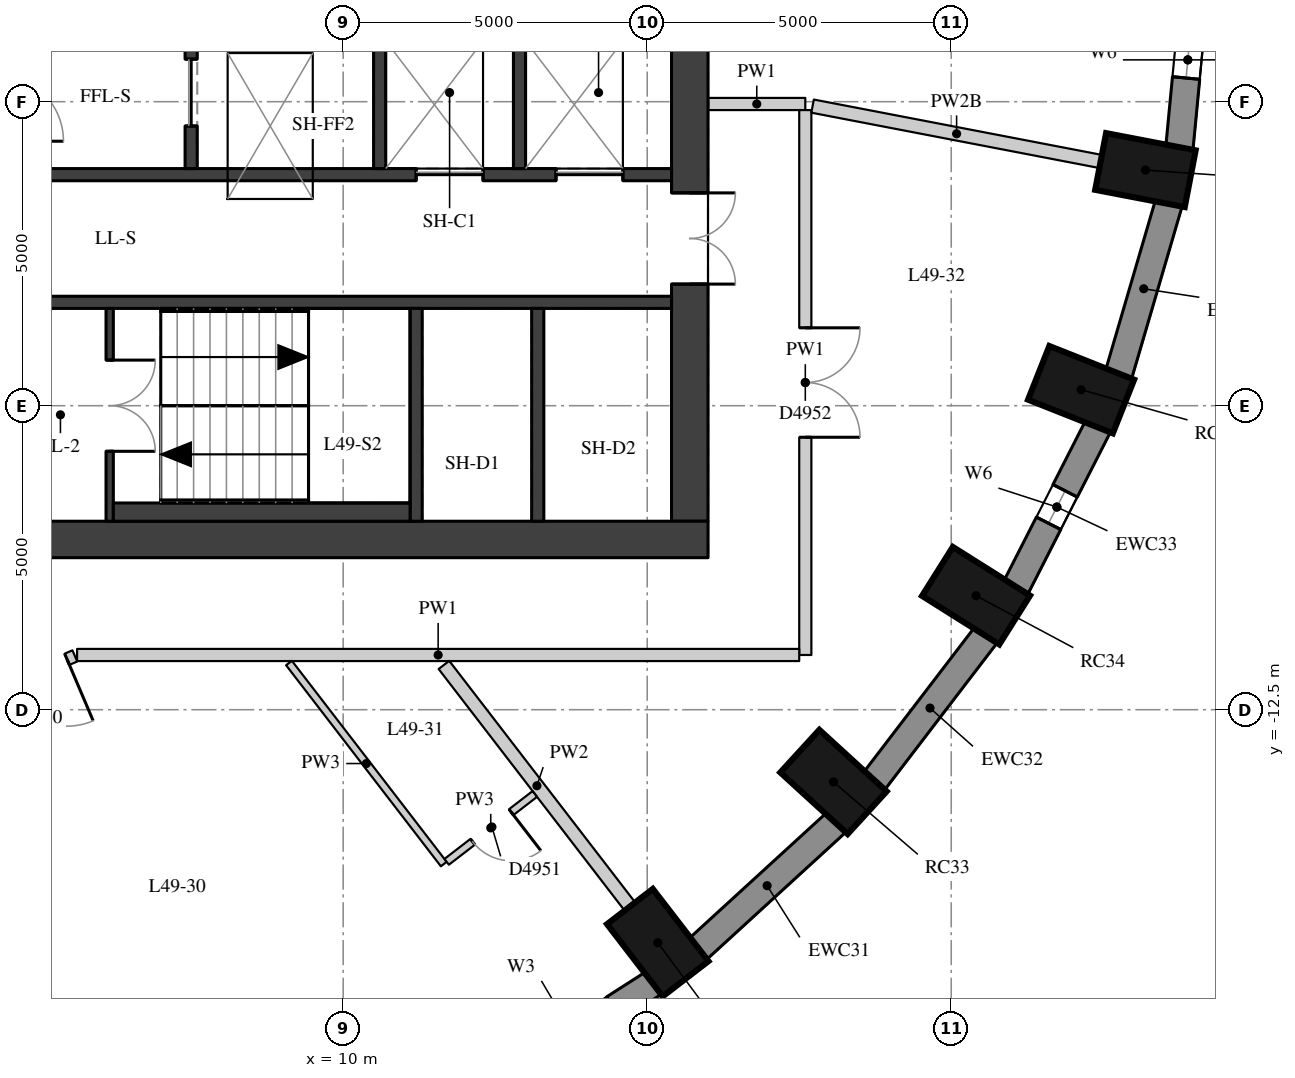
"""IFC4 building model, lengths in metres.
Left out: names, types, materials, properties, quantities, classifications, styles, units other than length and angle.
Written with IfcOpenShell. Run it as: python <this file> out.ifc"""

import sys

from ifc_helpers import new_model, si_unit, direction, frame, frame_2d, origin, origin_2d, place, context, subcontext, project, spatial, rectangle, extrude, element, fill, save


model = new_model("IFC4")
c1 = context("Model", 3, precision=1e-05, world=origin(), true_north=direction((0.0, 1.0)))
c2 = subcontext(c1, "Body", "Model", "MODEL_VIEW")
j1 = project(units=[si_unit("LENGTHUNIT", "METRE"), si_unit("PLANEANGLEUNIT", "RADIAN")], contexts=[c1])
p1 = place(None, origin())
s1 = spatial("IfcSite", under=j1, at=p1, CompositionType="ELEMENT")
p2 = place(p1, origin())
s2 = spatial("IfcBuilding", under=s1, at=p2, CompositionType="ELEMENT")
p3 = place(p2, frame((0.0, 0.0, 174.8)))
s3 = spatial("IfcBuildingStorey", under=s2, at=p3, CompositionType="ELEMENT", Elevation=174.8)
for number, where, z_axis, x_axis in (
    (1, (15.173, -16.332, 0.0), (0.0, 0.0, 1.0), (0.61, -0.792, 0.0)),
    (2, (18.064, -13.688, 0.0), (0.0, 0.0, 1.0), (0.738, -0.675, 0.0)),
    (3, (20.408, -10.625, 0.0), (0.0, 0.0, 1.0), (0.846, -0.533, 0.0)),
    (4, (22.136, -7.236, 0.0), (0.0, 0.0, 1.0), (0.93, -0.369, 0.0)),
    (5, (23.194, -3.625, 0.0), (0.0, 0.0, 1.0), (0.982, -0.189, 0.0)),
):
    element("IfcColumn", number, at=place(p3, frame(where, z_axis=z_axis, x_axis=x_axis)), inside=s3, PredefinedType="COLUMN", context=c2, shape_type="SweptSolid", body=[
        extrude(rectangle(XDim=1.5, YDim=0.95, at=origin_2d()), origin(), (0.0, 0.0, 1.0), 3.3),
    ])
p4 = place(p3, frame((12.455, -18.693, 0.0), z_axis=(0.0, 0.0, 1.0), x_axis=(0.842065914439, 0.539374633943, 0.0)))
e6 = element("IfcWall", 6, at=p4, inside=s3, PredefinedType="SOLIDWALL", context=c2, shape_type="SweptSolid", body=[
    extrude(rectangle(XDim=3.151, YDim=0.45, at=frame_2d((1.576, 0.0))), origin(), (0.0, 0.0, 1.0), 3.02),
])
p5 = place(p4, frame((0.776, 0.0, 0.4)))
e7 = element("IfcOpeningElement", 7, at=p5, cuts=e6, PredefinedType="OPENING", context=c2, shape_type="SweptSolid", body=[
    extrude(rectangle(XDim=1.6, YDim=1.75, at=frame_2d((0.8, 0.875))), frame((0.0, 0.235, 0.0), z_axis=(0.0, -1.0, 0.0), x_axis=(1.0, 0.0, 0.0)), (0.0, 0.0, 1.0), 0.47),
])
p6 = place(p3, frame((15.83, -16.439, 0.0), z_axis=(0.0, 0.0, 1.0), x_axis=(0.737808755941, 0.675009807082, 0.0)))
e8 = element("IfcWall", 8, at=p6, inside=s3, PredefinedType="SOLIDWALL", context=c2, shape_type="SweptSolid", body=[
    extrude(rectangle(XDim=3.094, YDim=0.45, at=frame_2d((1.547, 0.0))), origin(), (0.0, 0.0, 1.0), 3.02),
])
p7 = place(p3, frame((18.728, -13.679, 0.0), z_axis=(0.0, 0.0, 1.0), x_axis=(0.607817056371, 0.794077090706, 0.0)))
e9 = element("IfcWall", 9, at=p7, inside=s3, PredefinedType="SOLIDWALL", context=c2, shape_type="SweptSolid", body=[
    extrude(rectangle(XDim=3.037, YDim=0.45, at=frame_2d((1.519, 0.0))), origin(), (0.0, 0.0, 1.0), 3.02),
])
p8 = place(p3, frame((21.059, -10.497, 0.0), z_axis=(0.0, 0.0, 1.0), x_axis=(0.454133999889, 0.890933392653, 0.0)))
e10 = element("IfcWall", 10, at=p8, inside=s3, PredefinedType="SOLIDWALL", context=c2, shape_type="SweptSolid", body=[
    extrude(rectangle(XDim=2.986, YDim=0.45, at=frame_2d((1.493, 0.0))), origin(), (0.0, 0.0, 1.0), 3.02),
])
p9 = place(p8, frame((1.193, 0.0, 0.4)))
e11 = element("IfcOpeningElement", 11, at=p9, cuts=e10, PredefinedType="OPENING", context=c2, shape_type="SweptSolid", body=[
    extrude(rectangle(XDim=0.6, YDim=1.75, at=frame_2d((0.3, 0.875))), frame((0.0, 0.235, 0.0), z_axis=(0.0, -1.0, 0.0), x_axis=(1.0, 0.0, 0.0)), (0.0, 0.0, 1.0), 0.47),
])
p10 = place(p3, frame((22.751, -6.991, 0.0), z_axis=(0.0, 0.0, 1.0), x_axis=(0.281049481624, 0.959693278542, 0.0)))
e12 = element("IfcWall", 12, at=p10, inside=s3, PredefinedType="SOLIDWALL", context=c2, shape_type="SweptSolid", body=[
    extrude(rectangle(XDim=2.948, YDim=0.45, at=frame_2d((1.474, 0.0))), origin(), (0.0, 0.0, 1.0), 3.02),
])
p11 = place(p3, frame((23.752, -3.269, 0.0), z_axis=(0.0, 0.0, 1.0), x_axis=(0.095257827044, 0.995452633924, 0.0)))
e13 = element("IfcWall", 13, at=p11, inside=s3, PredefinedType="SOLIDWALL", context=c2, shape_type="SweptSolid", body=[
    extrude(rectangle(XDim=2.927, YDim=0.45, at=frame_2d((1.463, 0.0))), origin(), (0.0, 0.0, 1.0), 3.02),
])
p12 = place(p11, frame((1.163, 0.0, 0.4)))
e14 = element("IfcOpeningElement", 14, at=p12, cuts=e13, PredefinedType="OPENING", context=c2, shape_type="SweptSolid", body=[
    extrude(rectangle(XDim=0.6, YDim=1.75, at=frame_2d((0.3, 0.875))), frame((0.0, 0.235, 0.0), z_axis=(0.0, -1.0, 0.0), x_axis=(1.0, 0.0, 0.0)), (0.0, 0.0, 1.0), 0.47),
])
p13 = place(p3, frame((15.7, -9.4, 0.0), z_axis=(0.0, 0.0, 1.0), x_axis=(0.0, 1.0, 0.0)))
e15 = element("IfcWall", 15, at=p13, inside=s3, PredefinedType="SHEAR", context=c2, shape_type="SweptSolid", body=[
    extrude(rectangle(XDim=18.8, YDim=0.6, at=frame_2d((9.4, 0.0))), origin(), (0.0, 0.0, 1.0), 3.02),
])
p14 = place(p13, frame((13.4, 0.0, 0.0)))
e16 = element("IfcOpeningElement", 16, at=p14, cuts=e15, PredefinedType="OPENING", context=c2, shape_type="SweptSolid", body=[
    extrude(rectangle(XDim=1.5, YDim=2.1, at=frame_2d((0.75, 1.05))), frame((0.0, 0.31, 0.0), z_axis=(0.0, -1.0, 0.0), x_axis=(1.0, 0.0, 0.0)), (0.0, 0.0, 1.0), 0.62),
])
p15 = place(p13, frame((3.9, 0.0, 0.0)))
e17 = element("IfcOpeningElement", 17, at=p15, cuts=e15, PredefinedType="OPENING", context=c2, shape_type="SweptSolid", body=[
    extrude(rectangle(XDim=1.5, YDim=2.1, at=frame_2d((0.75, 1.05))), frame((0.0, 0.31, 0.0), z_axis=(0.0, -1.0, 0.0), x_axis=(1.0, 0.0, 0.0)), (0.0, 0.0, 1.0), 0.62),
])
p16 = place(p3, frame((4.0, -9.7, 0.0), z_axis=(0.0, 0.0, 1.0), x_axis=(1.0, 0.0, 0.0)))
e18 = element("IfcWall", 18, at=p16, inside=s3, PredefinedType="SHEAR", context=c2, shape_type="SweptSolid", body=[
    extrude(rectangle(XDim=12.0, YDim=0.6, at=frame_2d((6.0, 0.0))), origin(), (0.0, 0.0, 1.0), 3.02),
])
p17 = place(p3, frame((4.6, -3.7, 0.0), z_axis=(0.0, 0.0, 1.0), x_axis=(1.0, 0.0, 0.0)))
e19 = element("IfcWall", 19, at=p17, inside=s3, PredefinedType="SHEAR", context=c2, shape_type="SweptSolid", body=[
    extrude(rectangle(XDim=10.8, YDim=0.2, at=frame_2d((5.4, 0.0))), origin(), (0.0, 0.0, 1.0), 3.02),
])
p18 = place(p17, frame((6.6, 0.0, 0.0)))
e20 = element("IfcOpeningElement", 20, at=p18, cuts=e19, PredefinedType="OPENING", context=c2, shape_type="SweptSolid", body=[
    extrude(rectangle(XDim=1.1, YDim=2.1, at=frame_2d((0.55, 1.05))), frame((0.0, 0.11, 0.0), z_axis=(0.0, -1.0, 0.0), x_axis=(1.0, 0.0, 0.0)), (0.0, 0.0, 1.0), 0.22),
])
p19 = place(p17, frame((8.9, 0.0, 0.0)))
e21 = element("IfcOpeningElement", 21, at=p19, cuts=e19, PredefinedType="OPENING", context=c2, shape_type="SweptSolid", body=[
    extrude(rectangle(XDim=1.1, YDim=2.1, at=frame_2d((0.55, 1.05))), frame((0.0, 0.11, 0.0), z_axis=(0.0, -1.0, 0.0), x_axis=(1.0, 0.0, 0.0)), (0.0, 0.0, 1.0), 0.22),
])
p20 = place(p3, frame((4.6, -5.8, 0.0), z_axis=(0.0, 0.0, 1.0), x_axis=(1.0, 0.0, 0.0)))
e22 = element("IfcWall", 22, at=p20, inside=s3, PredefinedType="SHEAR", context=c2, shape_type="SweptSolid", body=[
    extrude(rectangle(XDim=10.8, YDim=0.2, at=frame_2d((5.4, 0.0))), origin(), (0.0, 0.0, 1.0), 3.02),
])
for number, where, z_axis, x_axis in (
    (23, (11.2, -9.4, 0.0), (0.0, 0.0, 1.0), (0.0, 1.0, 0.0)),
    (24, (13.2, -9.4, 0.0), (0.0, 0.0, 1.0), (0.0, 1.0, 0.0)),
):
    element("IfcWall", number, at=place(p3, frame(where, z_axis=z_axis, x_axis=x_axis)), inside=s3, PredefinedType="SHEAR", context=c2, shape_type="SweptSolid", body=[
        extrude(rectangle(XDim=3.5, YDim=0.2, at=frame_2d((1.75, 0.0))), origin(), (0.0, 0.0, 1.0), 3.02),
    ])
p21 = place(p3, frame((7.5, -3.6, 0.0), z_axis=(0.0, 0.0, 1.0), x_axis=(0.0, 1.0, 0.0)))
e25 = element("IfcWall", 25, at=p21, inside=s3, PredefinedType="SHEAR", context=c2, shape_type="SweptSolid", body=[
    extrude(rectangle(XDim=2.5, YDim=0.2, at=frame_2d((1.25, 0.0))), origin(), (0.0, 0.0, 1.0), 3.02),
])
p22 = place(p21, frame((0.7, 0.0, 0.0)))
e26 = element("IfcOpeningElement", 26, at=p22, cuts=e25, PredefinedType="OPENING", context=c2, shape_type="SweptSolid", body=[
    extrude(rectangle(XDim=1.1, YDim=2.1, at=frame_2d((0.55, 1.05))), frame((0.0, 0.11, 0.0), z_axis=(0.0, -1.0, 0.0), x_axis=(1.0, 0.0, 0.0)), (0.0, 0.0, 1.0), 0.22),
])
for number, where, z_axis, x_axis in (
    (27, (10.6, -3.6, 0.0), (0.0, 0.0, 1.0), (0.0, 1.0, 0.0)),
    (28, (12.9, -3.6, 0.0), (0.0, 0.0, 1.0), (0.0, 1.0, 0.0)),
):
    element("IfcWall", number, at=place(p3, frame(where, z_axis=z_axis, x_axis=x_axis)), inside=s3, PredefinedType="SHEAR", context=c2, shape_type="SweptSolid", body=[
        extrude(rectangle(XDim=2.5, YDim=0.2, at=frame_2d((1.25, 0.0))), origin(), (0.0, 0.0, 1.0), 3.02),
    ])
p23 = place(p3, frame((6.16, -9.4, 0.0), z_axis=(0.0, 0.0, 1.0), x_axis=(0.0, 1.0, 0.0)))
e29 = element("IfcWall", 29, at=p23, inside=s3, PredefinedType="SHEAR", context=c2, shape_type="SweptSolid", body=[
    extrude(rectangle(XDim=3.5, YDim=0.12, at=frame_2d((1.75, 0.0))), origin(), (0.0, 0.0, 1.0), 3.02),
])
p24 = place(p23, frame((1.15, 0.0, 0.0)))
e30 = element("IfcOpeningElement", 30, at=p24, cuts=e29, PredefinedType="OPENING", context=c2, shape_type="SweptSolid", body=[
    extrude(rectangle(XDim=1.5, YDim=2.1, at=frame_2d((0.75, 1.05))), frame((0.0, 0.07, 0.0), z_axis=(0.0, -1.0, 0.0), x_axis=(1.0, 0.0, 0.0)), (0.0, 0.0, 1.0), 0.14),
])
p25 = place(p3, frame((6.22, -9.25, 0.0), z_axis=(0.0, 0.0, 1.0), x_axis=(1.0, 0.0, 0.0)))
e31 = element("IfcWall", 31, at=p25, inside=s3, PredefinedType="PARTITIONING", context=c2, shape_type="SweptSolid", body=[
    extrude(rectangle(XDim=4.88, YDim=0.3, at=frame_2d((2.44, 0.0))), origin(), (0.0, 0.0, 1.0), 3.02),
])
p26 = place(p3, frame((16.004, -2.538, 0.0), z_axis=(0.0, 0.0, 1.0), x_axis=(1.0, 0.0, 0.0)))
e32 = element("IfcWall", 32, at=p26, inside=s3, PredefinedType="PARTITIONING", context=c2, shape_type="SweptSolid", body=[
    extrude(rectangle(XDim=1.596, YDim=0.2, at=frame_2d((0.798, 0.0))), origin(), (0.0, 0.0, 1.0), 3.02),
])
p27 = place(p3, frame((17.6, -2.638, 0.0), z_axis=(0.0, 0.0, 1.0), x_axis=(0.0, -1.0, 0.0)))
e33 = element("IfcWall", 33, at=p27, inside=s3, PredefinedType="PARTITIONING", context=c2, shape_type="SweptSolid", body=[
    extrude(rectangle(XDim=8.962, YDim=0.2, at=frame_2d((4.481, 0.0))), origin(), (0.0, 0.0, 1.0), 3.02),
])
p28 = place(p27, frame((3.581, 0.0, 0.0)))
e34 = element("IfcOpeningElement", 34, at=p28, cuts=e33, PredefinedType="OPENING", context=c2, shape_type="SweptSolid", body=[
    extrude(rectangle(XDim=1.8, YDim=2.1, at=frame_2d((0.9, 1.05))), frame((0.0, 0.11, 0.0), z_axis=(0.0, -1.0, 0.0), x_axis=(1.0, 0.0, 0.0)), (0.0, 0.0, 1.0), 0.22),
])
p29 = place(p3, frame((17.5, -11.6, 0.0), z_axis=(0.0, 0.0, 1.0), x_axis=(-1.0, 0.0, 0.0)))
e35 = element("IfcWall", 35, at=p29, inside=s3, PredefinedType="PARTITIONING", context=c2, shape_type="SweptSolid", body=[
    extrude(rectangle(XDim=11.876, YDim=0.2, at=frame_2d((5.938, 0.0))), origin(), (0.0, 0.0, 1.0), 3.02),
])
p30 = place(p3, frame((5.587, -11.616, 0.0), z_axis=(0.0, 0.0, 1.0), x_axis=(-0.920312454828, -0.391184081334, 0.0)))
e36 = element("IfcWall", 36, at=p30, inside=s3, PredefinedType="PARTITIONING", context=c2, shape_type="SweptSolid", body=[
    extrude(rectangle(XDim=2.975, YDim=0.2, at=frame_2d((1.488, 0.0))), origin(), (0.0, 0.0, 1.0), 3.02),
])
p31 = place(p30, frame((0.14, 0.0, 0.0)))
e37 = element("IfcOpeningElement", 37, at=p31, cuts=e36, PredefinedType="OPENING", context=c2, shape_type="SweptSolid", body=[
    extrude(rectangle(XDim=1.1, YDim=2.1, at=frame_2d((0.55, 1.05))), frame((0.0, 0.11, 0.0), z_axis=(0.0, -1.0, 0.0), x_axis=(1.0, 0.0, 0.0)), (0.0, 0.0, 1.0), 0.22),
])
p32 = place(p3, frame((14.716, -15.737, 0.0), z_axis=(0.0, 0.0, 1.0), x_axis=(-0.609986007715, 0.792412184657, 0.0)))
e38 = element("IfcWall", 38, at=p32, inside=s3, PredefinedType="PARTITIONING", context=c2, shape_type="SweptSolid", body=[
    extrude(rectangle(XDim=5.015, YDim=0.22, at=frame_2d((2.507, 0.0))), origin(), (0.0, 0.0, 1.0), 3.02),
])
p33 = place(p3, frame((22.457, -3.483, 0.0), z_axis=(0.0, 0.0, 1.0), x_axis=(-0.982022686577, 0.188762928159, 0.0)))
e39 = element("IfcWall", 39, at=p33, inside=s3, PredefinedType="PARTITIONING", context=c2, shape_type="SweptSolid", body=[
    extrude(rectangle(XDim=4.824, YDim=0.22, at=frame_2d((2.412, 0.0))), origin(), (0.0, 0.0, 1.0), 2.57),
])
p34 = place(p3, frame((9.109, -11.732, 0.0), z_axis=(0.0, 0.0, 1.0), x_axis=(0.609996270026, -0.79240428479, 0.0)))
e40 = element("IfcWall", 40, at=p34, inside=s3, PredefinedType="PARTITIONING", context=c2, shape_type="SweptSolid", body=[
    extrude(rectangle(XDim=4.173, YDim=0.12, at=frame_2d((2.087, 0.0))), origin(), (0.0, 0.0, 1.0), 3.02),
])
p35 = place(p3, frame((11.702, -15.002, 0.0), z_axis=(0.0, 0.0, 1.0), x_axis=(0.792395776304, 0.610007322657, 0.0)))
e41 = element("IfcWall", 41, at=p35, inside=s3, PredefinedType="PARTITIONING", context=c2, shape_type="SweptSolid", body=[
    extrude(rectangle(XDim=1.83, YDim=0.12, at=frame_2d((0.915, 0.0))), origin(), (0.0, 0.0, 1.0), 3.02),
])
p36 = place(p35, frame((0.54, 0.0, 0.0)))
e42 = element("IfcOpeningElement", 42, at=p36, cuts=e41, PredefinedType="OPENING", context=c2, shape_type="SweptSolid", body=[
    extrude(rectangle(XDim=0.8, YDim=2.1, at=frame_2d((0.4, 1.05))), frame((0.0, 0.07, 0.0), z_axis=(0.0, -1.0, 0.0), x_axis=(1.0, 0.0, 0.0)), (0.0, 0.0, 1.0), 0.14),
])
p37 = place(p9, origin())
e43 = element("IfcWindow", 43, at=p37, inside=s3, PartitioningType="SINGLE_PANEL", PredefinedType="WINDOW", context=c2, shape_type="SweptSolid", body=[
    extrude(rectangle(XDim=0.6, YDim=1.75, at=frame_2d((0.3, 0.875))), frame((0.0, 0.035, 0.0), z_axis=(0.0, -1.0, 0.0), x_axis=(1.0, 0.0, 0.0)), (0.0, 0.0, 1.0), 0.06),
])
fill(e11, e43)
p38 = place(p12, origin())
e44 = element("IfcWindow", 44, at=p38, inside=s3, PartitioningType="SINGLE_PANEL", PredefinedType="WINDOW", context=c2, shape_type="SweptSolid", body=[
    extrude(rectangle(XDim=0.6, YDim=1.75, at=frame_2d((0.3, 0.875))), frame((0.0, 0.035, 0.0), z_axis=(0.0, -1.0, 0.0), x_axis=(1.0, 0.0, 0.0)), (0.0, 0.0, 1.0), 0.06),
])
fill(e14, e44)
p39 = place(p15, origin())
e45 = element("IfcDoor", 45, at=p39, inside=s3, OperationType="DOUBLE_DOOR_SINGLE_SWING", PredefinedType="DOOR", context=c2, shape_type="SweptSolid", body=[
    extrude(rectangle(XDim=1.5, YDim=2.1, at=frame_2d((0.75, 1.05))), frame((0.0, 0.025, 0.0), z_axis=(0.0, -1.0, 0.0), x_axis=(1.0, 0.0, 0.0)), (0.0, 0.0, 1.0), 0.05),
])
fill(e17, e45)
p40 = place(p24, origin())
e46 = element("IfcDoor", 46, at=p40, inside=s3, OperationType="DOUBLE_DOOR_SINGLE_SWING", PredefinedType="DOOR", context=c2, shape_type="SweptSolid", body=[
    extrude(rectangle(XDim=1.5, YDim=2.1, at=frame_2d((0.75, 1.05))), frame((0.0, 0.025, 0.0), z_axis=(0.0, -1.0, 0.0), x_axis=(1.0, 0.0, 0.0)), (0.0, 0.0, 1.0), 0.05),
])
fill(e30, e46)
p41 = place(p18, origin())
e47 = element("IfcDoor", 47, at=p41, inside=s3, OperationType="DOUBLE_DOOR_SLIDING", PredefinedType="DOOR", context=c2, shape_type="SweptSolid", body=[
    extrude(rectangle(XDim=1.1, YDim=2.1, at=frame_2d((0.55, 1.05))), frame((0.0, 0.025, 0.0), z_axis=(0.0, -1.0, 0.0), x_axis=(1.0, 0.0, 0.0)), (0.0, 0.0, 1.0), 0.05),
])
fill(e20, e47)
p42 = place(p19, origin())
e48 = element("IfcDoor", 48, at=p42, inside=s3, OperationType="DOUBLE_DOOR_SLIDING", PredefinedType="DOOR", context=c2, shape_type="SweptSolid", body=[
    extrude(rectangle(XDim=1.1, YDim=2.1, at=frame_2d((0.55, 1.05))), frame((0.0, 0.025, 0.0), z_axis=(0.0, -1.0, 0.0), x_axis=(1.0, 0.0, 0.0)), (0.0, 0.0, 1.0), 0.05),
])
fill(e21, e48)
p43 = place(p22, origin())
e49 = element("IfcDoor", 49, at=p43, inside=s3, OperationType="DOUBLE_DOOR_SLIDING", PredefinedType="DOOR", context=c2, shape_type="SweptSolid", body=[
    extrude(rectangle(XDim=1.1, YDim=2.1, at=frame_2d((0.55, 1.05))), frame((0.0, 0.025, 0.0), z_axis=(0.0, -1.0, 0.0), x_axis=(1.0, 0.0, 0.0)), (0.0, 0.0, 1.0), 0.05),
])
fill(e26, e49)
p44 = place(p31, origin())
e50 = element("IfcDoor", 50, at=p44, inside=s3, OperationType="SINGLE_SWING_LEFT", PredefinedType="DOOR", context=c2, shape_type="SweptSolid", body=[
    extrude(rectangle(XDim=1.1, YDim=2.1, at=frame_2d((0.55, 1.05))), frame((0.0, 0.025, 0.0), z_axis=(0.0, -1.0, 0.0), x_axis=(1.0, 0.0, 0.0)), (0.0, 0.0, 1.0), 0.05),
])
fill(e37, e50)
p45 = place(p36, origin())
e51 = element("IfcDoor", 51, at=p45, inside=s3, OperationType="SINGLE_SWING_LEFT", PredefinedType="DOOR", context=c2, shape_type="SweptSolid", body=[
    extrude(rectangle(XDim=0.8, YDim=2.1, at=frame_2d((0.4, 1.05))), frame((0.0, 0.025, 0.0), z_axis=(0.0, -1.0, 0.0), x_axis=(1.0, 0.0, 0.0)), (0.0, 0.0, 1.0), 0.05),
])
fill(e42, e51)
p46 = place(p28, origin())
e52 = element("IfcDoor", 52, at=p46, inside=s3, OperationType="DOUBLE_DOOR_SINGLE_SWING", PredefinedType="DOOR", context=c2, shape_type="SweptSolid", body=[
    extrude(rectangle(XDim=1.8, YDim=2.1, at=frame_2d((0.9, 1.05))), frame((0.0, 0.025, 0.0), z_axis=(0.0, -1.0, 0.0), x_axis=(1.0, 0.0, 0.0)), (0.0, 0.0, 1.0), 0.05),
])
fill(e34, e52)
save(model, sys.argv[1])
